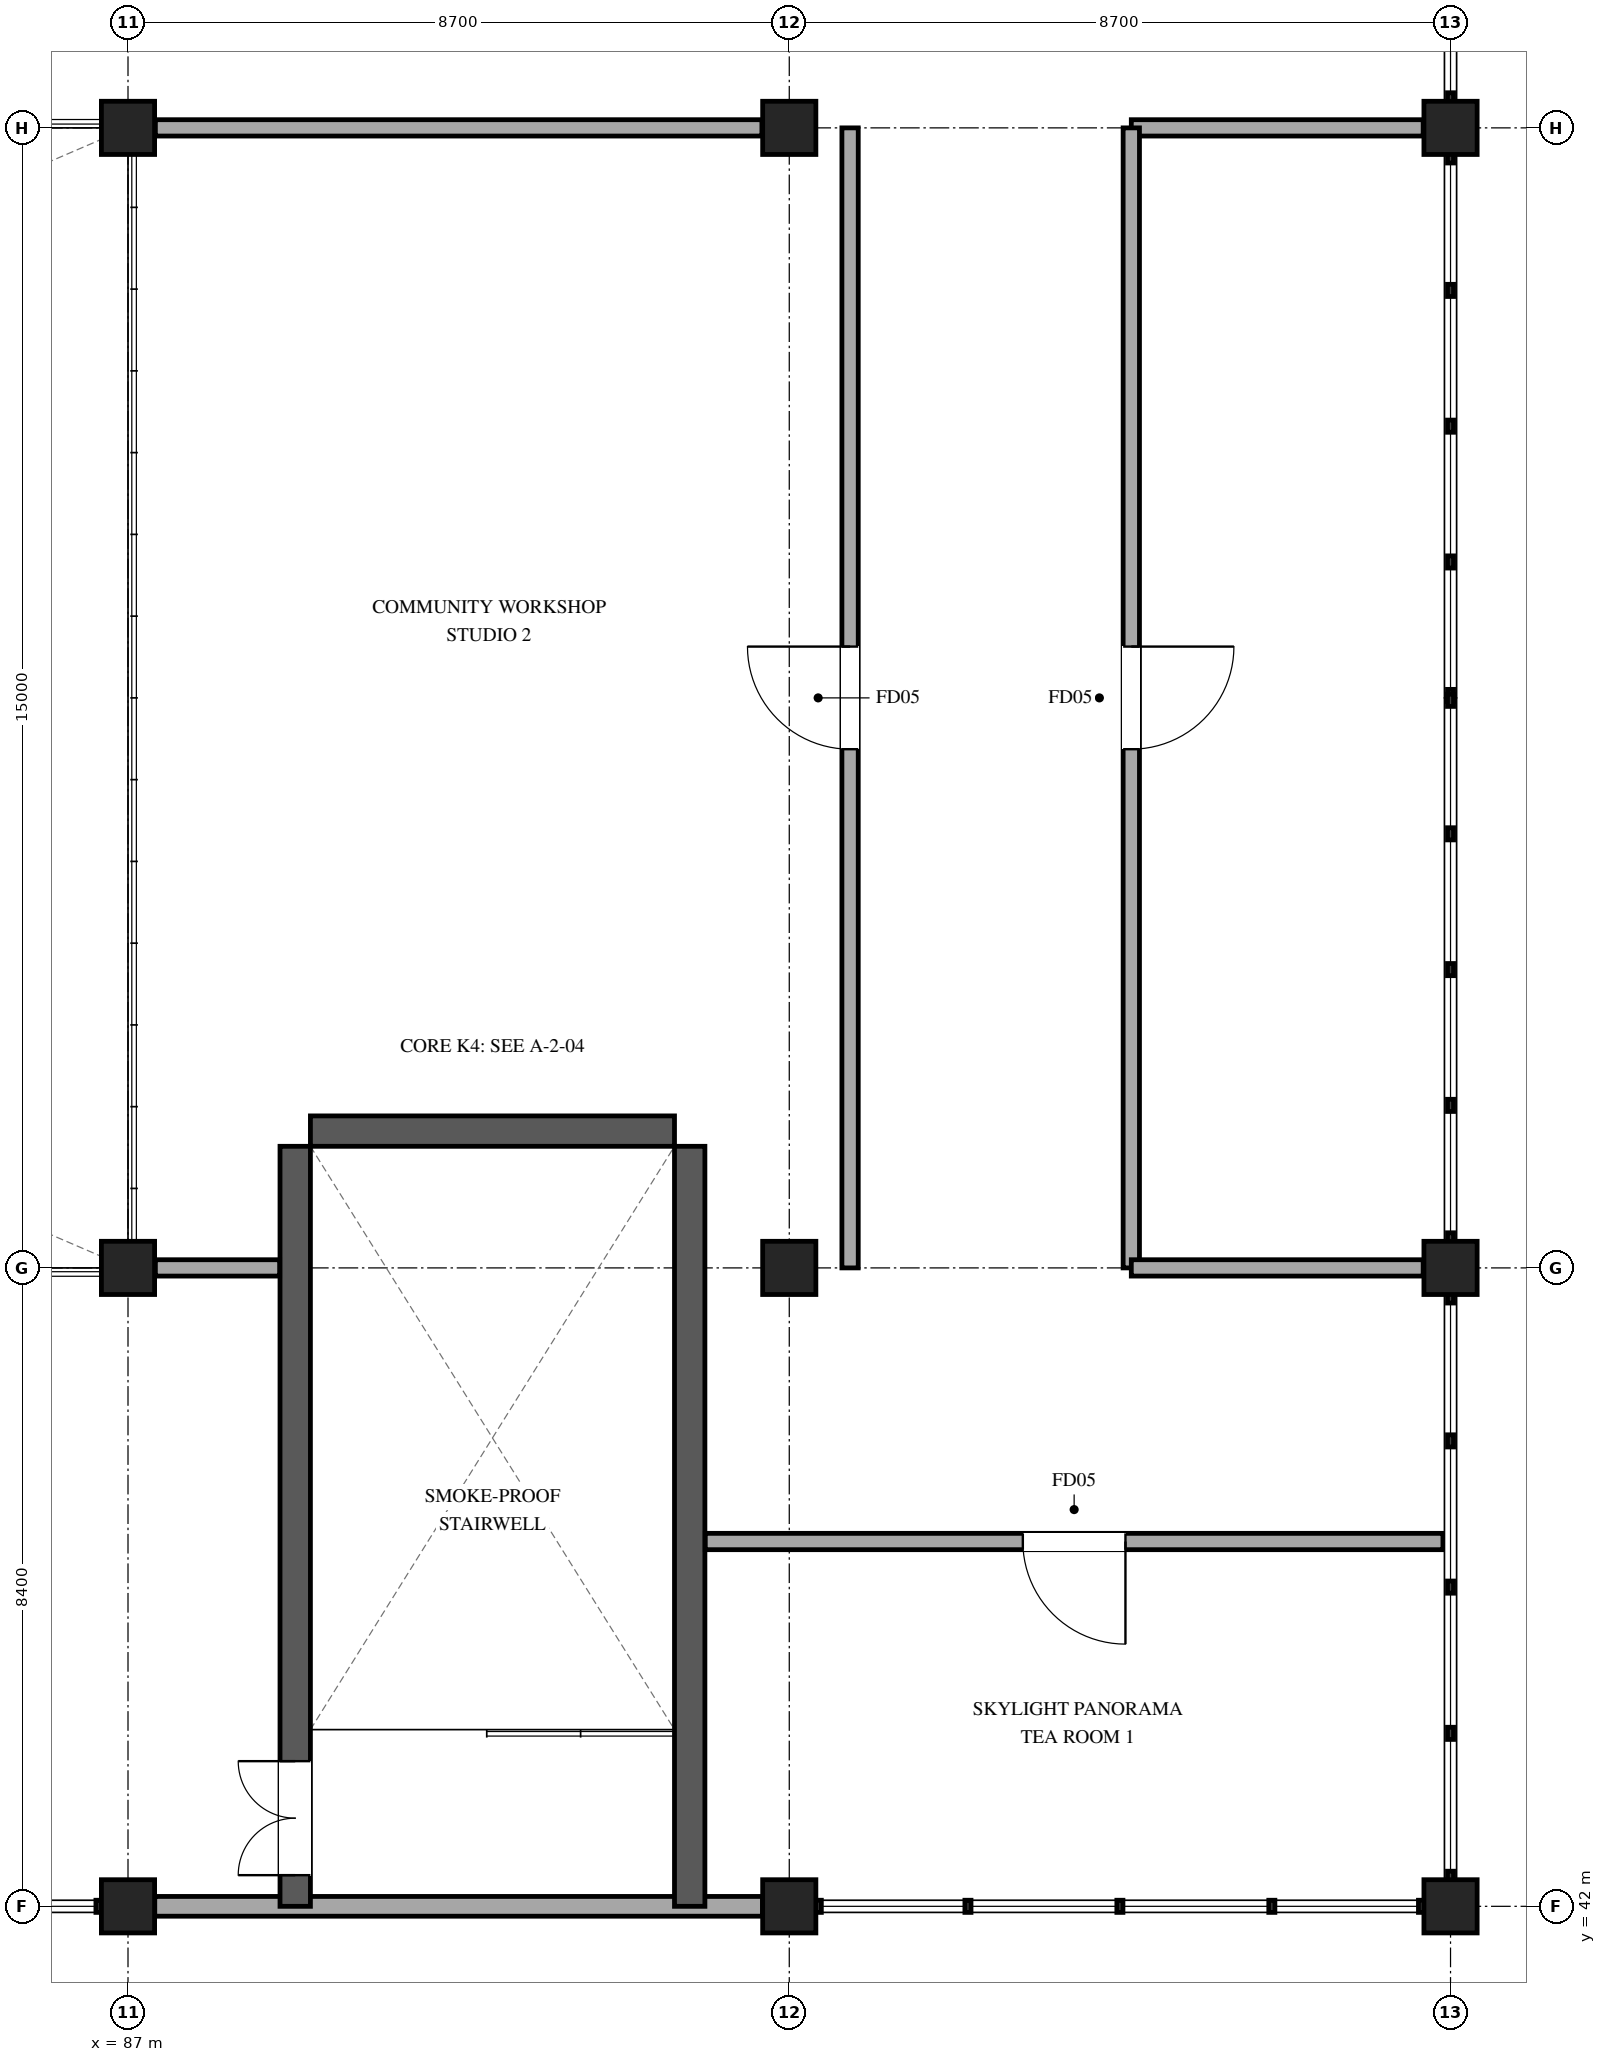
"""IFC4 building model, lengths in metres.
Left out: names, types, materials, properties, quantities, classifications, styles, units other than length and angle.
Written with IfcOpenShell. Run it as: python <this file> out.ifc"""

import sys

from ifc_helpers import new_model, si_unit, direction, frame, frame_2d, origin, origin_2d, place, context, subcontext, project, spatial, rectangle, extrude, element, fill, save


model = new_model("IFC4")
c1 = context("Model", 3, precision=1e-05, world=origin(), true_north=direction((0.0, 1.0)))
c2 = subcontext(c1, "Body", "Model", "MODEL_VIEW")
j1 = project(units=[si_unit("LENGTHUNIT", "METRE"), si_unit("PLANEANGLEUNIT", "RADIAN")], contexts=[c1])
p1 = place(None, origin())
s1 = spatial("IfcSite", under=j1, at=p1, CompositionType="ELEMENT")
p2 = place(p1, origin())
s2 = spatial("IfcBuilding", under=s1, at=p2, CompositionType="ELEMENT")
p3 = place(p2, frame((0.0, 0.0, 31.5)))
s3 = spatial("IfcBuildingStorey", under=s2, at=p3, CompositionType="ELEMENT", Elevation=31.5)
for number, where, z_axis, x_axis in (
    (1, (87.0, 42.0, 0.0), (0.0, 0.0, 1.0), (1.0, 0.0, 0.0)),
    (2, (87.0, 50.4, 0.0), (0.0, 0.0, 1.0), (1.0, 0.0, 0.0)),
    (3, (87.0, 65.4, 0.0), (0.0, 0.0, 1.0), (1.0, 0.0, 0.0)),
    (4, (95.7, 42.0, 0.0), (0.0, 0.0, 1.0), (1.0, 0.0, 0.0)),
    (5, (95.7, 50.4, 0.0), (0.0, 0.0, 1.0), (1.0, 0.0, 0.0)),
    (6, (95.7, 65.4, 0.0), (0.0, 0.0, 1.0), (1.0, 0.0, 0.0)),
    (7, (104.4, 42.0, 0.0), (0.0, 0.0, 1.0), (1.0, 0.0, 0.0)),
    (8, (104.4, 50.4, 0.0), (0.0, 0.0, 1.0), (1.0, 0.0, 0.0)),
    (9, (104.4, 65.4, 0.0), (0.0, 0.0, 1.0), (1.0, 0.0, 0.0)),
):
    element("IfcColumn", number, at=place(p3, frame(where, z_axis=z_axis, x_axis=x_axis)), inside=s3, PredefinedType="COLUMN", context=c2, shape_type="SweptSolid", body=[
        extrude(rectangle(XDim=0.7, YDim=0.7, at=origin_2d()), origin(), (0.0, 0.0, 1.0), 4.8),
    ])
p4 = place(p3, frame((95.348, 42.0, 0.0), z_axis=(0.0, 0.0, 1.0), x_axis=(-1.0, 0.0, 0.0)))
e10 = element("IfcWall", 10, at=p4, inside=s3, PredefinedType="STANDARD", context=c2, shape_type="SweptSolid", body=[
    extrude(rectangle(XDim=7.996, YDim=0.26, at=frame_2d((3.998, 0.0))), origin(), (0.0, 0.0, 1.0), 4.49),
])
p5 = place(p3, frame((89.2, 42.0, 0.0), z_axis=(0.0, 0.0, 1.0), x_axis=(0.0, 1.0, 0.0)))
e11 = element("IfcWall", 11, at=p5, inside=s3, PredefinedType="SHEAR", context=c2, shape_type="SweptSolid", body=[
    extrude(rectangle(XDim=10.0, YDim=0.4, at=frame_2d((5.0, 0.0))), origin(), (0.0, 0.0, 1.0), 4.8),
])
p6 = place(p5, frame((0.41, 0.0, 0.0)))
e12 = element("IfcOpeningElement", 12, at=p6, cuts=e11, PredefinedType="OPENING", context=c2, shape_type="SweptSolid", body=[
    extrude(rectangle(XDim=1.5, YDim=2.2, at=frame_2d((0.75, 1.1))), frame((0.0, 0.21, 0.0), z_axis=(0.0, -1.0, 0.0), x_axis=(1.0, 0.0, 0.0)), (0.0, 0.0, 1.0), 0.42),
])
p7 = place(p3, frame((94.39, 52.0, 0.0), z_axis=(0.0, 0.0, 1.0), x_axis=(0.0, -1.0, 0.0)))
e13 = element("IfcWall", 13, at=p7, inside=s3, PredefinedType="SHEAR", context=c2, shape_type="SweptSolid", body=[
    extrude(rectangle(XDim=10.0, YDim=0.4, at=frame_2d((5.0, 0.0))), origin(), (0.0, 0.0, 1.0), 4.8),
])
p8 = place(p3, frame((89.4, 52.2, 0.0), z_axis=(0.0, 0.0, 1.0), x_axis=(1.0, 0.0, 0.0)))
e14 = element("IfcWall", 14, at=p8, inside=s3, PredefinedType="SHEAR", context=c2, shape_type="SweptSolid", body=[
    extrude(rectangle(XDim=4.79, YDim=0.4, at=frame_2d((2.395, 0.0))), origin(), (0.0, 0.0, 1.0), 4.8),
])
p9 = place(p3, frame((104.3, 46.8, 0.0), z_axis=(0.0, 0.0, 1.0), x_axis=(-1.0, 0.0, 0.0)))
e15 = element("IfcWall", 15, at=p9, inside=s3, PredefinedType="PARTITIONING", context=c2, shape_type="SweptSolid", body=[
    extrude(rectangle(XDim=9.705, YDim=0.215, at=frame_2d((4.853, 0.0))), origin(), (0.0, 0.0, 1.0), 3.76),
])
p10 = place(p9, frame((4.177, 0.0, 0.0)))
e16 = element("IfcOpeningElement", 16, at=p10, cuts=e15, PredefinedType="OPENING", context=c2, shape_type="SweptSolid", body=[
    extrude(rectangle(XDim=1.35, YDim=2.2, at=frame_2d((0.675, 1.1))), frame((0.0, 0.118, 0.0), z_axis=(0.0, -1.0, 0.0), x_axis=(1.0, 0.0, 0.0)), (0.0, 0.0, 1.0), 0.235),
])
p11 = place(p3, frame((104.04, 65.4, 0.0), z_axis=(0.0, 0.0, 1.0), x_axis=(-1.0, 0.0, 0.0)))
e17 = element("IfcWall", 17, at=p11, inside=s3, PredefinedType="PARTITIONING", context=c2, shape_type="SweptSolid", body=[
    extrude(rectangle(XDim=3.84, YDim=0.215, at=frame_2d((1.92, 0.0))), origin(), (0.0, 0.0, 1.0), 3.56),
])
p12 = place(p3, frame((100.2, 65.4, 0.0), z_axis=(0.0, 0.0, 1.0), x_axis=(0.0, -1.0, 0.0)))
e18 = element("IfcWall", 18, at=p12, inside=s3, PredefinedType="PARTITIONING", context=c2, shape_type="SweptSolid", body=[
    extrude(rectangle(XDim=15.0, YDim=0.215, at=frame_2d((7.5, 0.0))), origin(), (0.0, 0.0, 1.0), 3.56),
])
p13 = place(p12, frame((6.825, 0.0, 0.0)))
e19 = element("IfcOpeningElement", 19, at=p13, cuts=e18, PredefinedType="OPENING", context=c2, shape_type="SweptSolid", body=[
    extrude(rectangle(XDim=1.35, YDim=2.2, at=frame_2d((0.675, 1.1))), frame((0.0, 0.118, 0.0), z_axis=(0.0, -1.0, 0.0), x_axis=(1.0, 0.0, 0.0)), (0.0, 0.0, 1.0), 0.235),
])
p14 = place(p3, frame((100.2, 50.4, 0.0), z_axis=(0.0, 0.0, 1.0), x_axis=(1.0, 0.0, 0.0)))
e20 = element("IfcWall", 20, at=p14, inside=s3, PredefinedType="PARTITIONING", context=c2, shape_type="SweptSolid", body=[
    extrude(rectangle(XDim=3.84, YDim=0.215, at=frame_2d((1.92, 0.0))), origin(), (0.0, 0.0, 1.0), 3.56),
])
p15 = place(p3, frame((87.36, 50.4, 0.0), z_axis=(0.0, 0.0, 1.0), x_axis=(1.0, 0.0, 0.0)))
e21 = element("IfcWall", 21, at=p15, inside=s3, PredefinedType="PARTITIONING", context=c2, shape_type="SweptSolid", body=[
    extrude(rectangle(XDim=1.635, YDim=0.215, at=frame_2d((0.817, 0.0))), origin(), (0.0, 0.0, 1.0), 4.46),
])
p16 = place(p3, frame((96.5, 50.4, 0.0), z_axis=(0.0, 0.0, 1.0), x_axis=(0.0, 1.0, 0.0)))
e22 = element("IfcWall", 22, at=p16, inside=s3, PredefinedType="PARTITIONING", context=c2, shape_type="SweptSolid", body=[
    extrude(rectangle(XDim=15.0, YDim=0.215, at=frame_2d((7.5, 0.0))), origin(), (0.0, 0.0, 1.0), 3.56),
])
p17 = place(p16, frame((6.825, 0.0, 0.0)))
e23 = element("IfcOpeningElement", 23, at=p17, cuts=e22, PredefinedType="OPENING", context=c2, shape_type="SweptSolid", body=[
    extrude(rectangle(XDim=1.35, YDim=2.2, at=frame_2d((0.675, 1.1))), frame((0.0, 0.118, 0.0), z_axis=(0.0, -1.0, 0.0), x_axis=(1.0, 0.0, 0.0)), (0.0, 0.0, 1.0), 0.235),
])
p18 = place(p3, frame((95.34, 65.4, 0.0), z_axis=(0.0, 0.0, 1.0), x_axis=(-1.0, 0.0, 0.0)))
e24 = element("IfcWall", 24, at=p18, inside=s3, PredefinedType="PARTITIONING", context=c2, shape_type="SweptSolid", body=[
    extrude(rectangle(XDim=7.98, YDim=0.215, at=frame_2d((3.99, 0.0))), origin(), (0.0, 0.0, 1.0), 3.56),
])
p19 = place(p6, origin())
e25 = element("IfcDoor", 25, at=p19, inside=s3, OperationType="DOUBLE_DOOR_SINGLE_SWING", PredefinedType="DOOR", context=c2, shape_type="SweptSolid", body=[
    extrude(rectangle(XDim=1.5, YDim=2.2, at=frame_2d((0.75, 1.1))), frame((0.0, 0.025, 0.0), z_axis=(0.0, -1.0, 0.0), x_axis=(1.0, 0.0, 0.0)), (0.0, 0.0, 1.0), 0.05),
])
fill(e12, e25)
p20 = place(p10, origin())
e26 = element("IfcDoor", 26, at=p20, inside=s3, OperationType="SINGLE_SWING_LEFT", PredefinedType="DOOR", context=c2, shape_type="SweptSolid", body=[
    extrude(rectangle(XDim=1.35, YDim=2.2, at=frame_2d((0.675, 1.1))), frame((0.0, 0.025, 0.0), z_axis=(0.0, -1.0, 0.0), x_axis=(1.0, 0.0, 0.0)), (0.0, 0.0, 1.0), 0.05),
])
fill(e16, e26)
p21 = place(p13, origin())
e27 = element("IfcDoor", 27, at=p21, inside=s3, OperationType="SINGLE_SWING_LEFT", PredefinedType="DOOR", context=c2, shape_type="SweptSolid", body=[
    extrude(rectangle(XDim=1.35, YDim=2.2, at=frame_2d((0.675, 1.1))), frame((0.0, 0.025, 0.0), z_axis=(0.0, -1.0, 0.0), x_axis=(1.0, 0.0, 0.0)), (0.0, 0.0, 1.0), 0.05),
])
fill(e19, e27)
p22 = place(p17, origin())
e28 = element("IfcDoor", 28, at=p22, inside=s3, OperationType="SINGLE_SWING_RIGHT", PredefinedType="DOOR", context=c2, shape_type="SweptSolid", body=[
    extrude(rectangle(XDim=1.35, YDim=2.2, at=frame_2d((0.675, 1.1))), frame((0.0, 0.025, 0.0), z_axis=(0.0, -1.0, 0.0), x_axis=(1.0, 0.0, 0.0)), (0.0, 0.0, 1.0), 0.05),
])
fill(e23, e28)
save(model, sys.argv[1])
